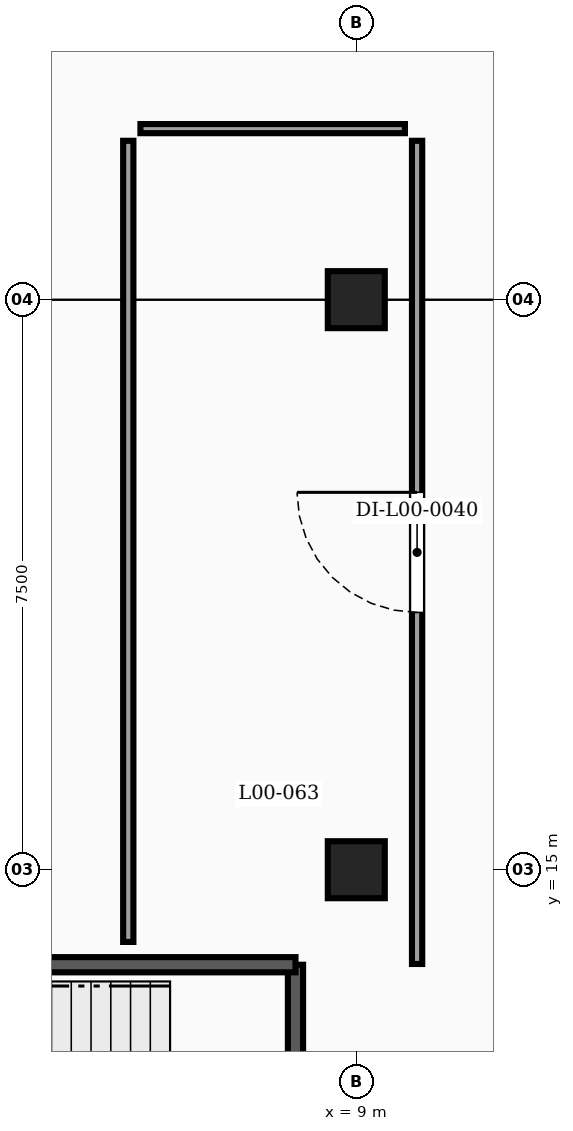
"""IFC4 building model, lengths in metres.
Left out: names, types, materials, properties, quantities, classifications, styles, units other than length and angle.
Written with IfcOpenShell. Run it as: python <this file> out.ifc"""

import sys

from ifc_helpers import new_model, si_unit, direction, frame, frame_2d, origin, origin_2d, place, context, subcontext, project, spatial, rectangle, extrude, element, fill, save


model = new_model("IFC4")
c1 = context("Model", 3, precision=1e-05, world=origin(), true_north=direction((0.0, 1.0)))
c2 = subcontext(c1, "Body", "Model", "MODEL_VIEW")
j1 = project(units=[si_unit("LENGTHUNIT", "METRE"), si_unit("PLANEANGLEUNIT", "RADIAN")], contexts=[c1])
p1 = place(None, origin())
s1 = spatial("IfcSite", under=j1, at=p1, CompositionType="ELEMENT")
p2 = place(p1, origin())
s2 = spatial("IfcBuilding", under=s1, at=p2, CompositionType="ELEMENT")
p3 = place(p2, origin())
s3 = spatial("IfcBuildingStorey", under=s2, at=p3, CompositionType="ELEMENT", Elevation=0.0)
for number, where, z_axis, x_axis in (
    (1, (9.0, 15.0, -0.25), (0.0, 0.0, 1.0), (1.0, 0.0, 0.0)),
    (2, (9.0, 22.5, -0.25), (0.0, 0.0, 1.0), (1.0, 0.0, 0.0)),
):
    element("IfcColumn", number, at=place(p3, frame(where, z_axis=z_axis, x_axis=x_axis)), inside=s3, PredefinedType="COLUMN", context=c2, shape_type="SweptSolid", body=[
        extrude(rectangle(XDim=0.75, YDim=0.75, at=origin_2d()), origin(), (0.0, 0.0, 1.0), 4.75),
    ])
p4 = place(p3, frame((8.2, 13.75, 0.0), z_axis=(0.0, 0.0, 1.0), x_axis=(0.0, -1.0, 0.0)))
e3 = element("IfcWall", 3, at=p4, inside=s3, PredefinedType="SHEAR", context=c2, shape_type="SweptSolid", body=[
    extrude(rectangle(XDim=5.0, YDim=0.2, at=frame_2d((2.5, 0.0))), origin(), (0.0, 0.0, 1.0), 4.09),
])
p5 = place(p4, frame((1.75, 0.0, 0.0)))
e4 = element("IfcOpeningElement", 4, at=p5, cuts=e3, PredefinedType="OPENING", context=c2, shape_type="SweptSolid", body=[
    extrude(rectangle(XDim=1.5, YDim=2.15, at=frame_2d((0.75, 1.075))), frame((0.0, 0.11, 0.0), z_axis=(0.0, -1.0, 0.0), x_axis=(1.0, 0.0, 0.0)), (0.0, 0.0, 1.0), 0.22),
])
p6 = place(p3, frame((8.2, 13.75, 0.0), z_axis=(0.0, 0.0, 1.0), x_axis=(-1.0, 0.0, 0.0)))
e5 = element("IfcWall", 5, at=p6, inside=s3, PredefinedType="SHEAR", context=c2, shape_type="SweptSolid", body=[
    extrude(rectangle(XDim=7.4, YDim=0.2, at=frame_2d((3.7, 0.0))), origin(), (0.0, 0.0, 1.0), 4.09),
])
p7 = place(p3, frame((9.8, 13.76, 0.0), z_axis=(0.0, 0.0, 1.0), x_axis=(0.0, 1.0, 0.0)))
e6 = element("IfcWall", 6, at=p7, inside=s3, PredefinedType="PARTITIONING", context=c2, shape_type="SweptSolid", body=[
    extrude(rectangle(XDim=10.83, YDim=0.135, at=frame_2d((5.415, 0.0))), origin(), (0.0, 0.0, 1.0), 4.09),
])
p8 = place(p7, frame((4.625, 0.0, 0.0)))
e7 = element("IfcOpeningElement", 7, at=p8, cuts=e6, PredefinedType="OPENING", context=c2, shape_type="SweptSolid", body=[
    extrude(rectangle(XDim=1.58, YDim=2.2, at=frame_2d((0.79, 1.1))), frame((0.0, 0.077, 0.0), z_axis=(0.0, -1.0, 0.0), x_axis=(1.0, 0.0, 0.0)), (0.0, 0.0, 1.0), 0.155),
])
p9 = place(p3, frame((9.64, 24.75, 0.0), z_axis=(0.0, 0.0, 1.0), x_axis=(-1.0, 0.0, 0.0)))
e8 = element("IfcWall", 8, at=p9, inside=s3, PredefinedType="PARTITIONING", context=c2, shape_type="SweptSolid", body=[
    extrude(rectangle(XDim=3.48, YDim=0.12, at=frame_2d((1.74, 0.0))), origin(), (0.0, 0.0, 1.0), 4.09),
])
p10 = place(p3, frame((6.0, 24.59, 0.0), z_axis=(0.0, 0.0, 1.0), x_axis=(0.0, -1.0, 0.0)))
e9 = element("IfcWall", 9, at=p10, inside=s3, PredefinedType="PARTITIONING", context=c2, shape_type="SweptSolid", body=[
    extrude(rectangle(XDim=10.54, YDim=0.135, at=frame_2d((5.27, 0.0))), origin(), (0.0, 0.0, 1.0), 3.775),
])
p11 = place(p8, origin())
e10 = element("IfcDoor", 10, at=p11, inside=s3, OperationType="SINGLE_SWING_RIGHT", PredefinedType="DOOR", context=c2, shape_type="SweptSolid", body=[
    extrude(rectangle(XDim=1.58, YDim=2.2, at=frame_2d((0.79, 1.1))), frame((0.0, 0.025, 0.0), z_axis=(0.0, -1.0, 0.0), x_axis=(1.0, 0.0, 0.0)), (0.0, 0.0, 1.0), 0.05),
])
fill(e7, e10)
save(model, sys.argv[1])
